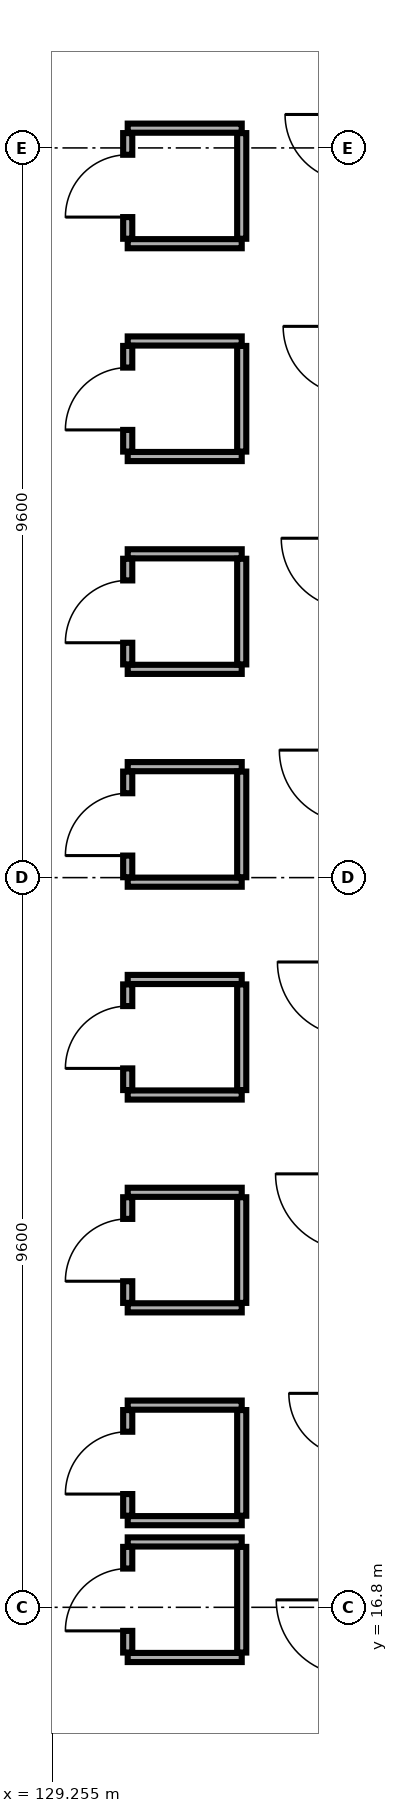
"""IFC4 building model, lengths in metres.
Left out: names, types, materials, properties, quantities, classifications, styles, units other than length and angle.
Written with IfcOpenShell. Run it as: python <this file> out.ifc"""

import sys

from ifc_helpers import new_model, si_unit, direction, frame, frame_2d, origin, place, context, subcontext, project, spatial, rectangle, extrude, element, fill, save


model = new_model("IFC4")
c1 = context("Model", 3, precision=1e-05, world=origin(), true_north=direction((0.0, 1.0)))
c2 = subcontext(c1, "Body", "Model", "MODEL_VIEW")
j1 = project(units=[si_unit("LENGTHUNIT", "METRE"), si_unit("PLANEANGLEUNIT", "RADIAN")], contexts=[c1])
p1 = place(None, origin())
s1 = spatial("IfcSite", under=j1, at=p1, CompositionType="ELEMENT")
p2 = place(p1, origin())
s2 = spatial("IfcBuilding", under=s1, at=p2, CompositionType="ELEMENT")
p3 = place(p2, frame((0.0, 0.0, 24.9)))
s3 = spatial("IfcBuildingStorey", under=s2, at=p3, CompositionType="ELEMENT", Elevation=24.9)
for number, where, z_axis, x_axis in (
    (1, (130.25, 34.74, 0.0), (0.0, 0.0, 1.0), (1.0, 0.0, 0.0)),
    (2, (130.25, 36.26, 0.0), (0.0, 0.0, 1.0), (1.0, 0.0, 0.0)),
):
    element("IfcWall", number, at=place(p3, frame(where, z_axis=z_axis, x_axis=x_axis)), inside=s3, PredefinedType="PARTITIONING", context=c2, shape_type="SweptSolid", body=[
        extrude(rectangle(XDim=1.5, YDim=0.12, at=frame_2d((0.75, 0.0))), origin(), (0.0, 0.0, 1.0), 3.19),
    ])
p4 = place(p3, frame((130.25, 34.805, 0.0), z_axis=(0.0, 0.0, 1.0), x_axis=(0.0, 1.0, 0.0)))
e3 = element("IfcWall", 3, at=p4, inside=s3, PredefinedType="PARTITIONING", context=c2, shape_type="SweptSolid", body=[
    extrude(rectangle(XDim=1.39, YDim=0.12, at=frame_2d((0.695, 0.0))), origin(), (0.0, 0.0, 1.0), 3.19),
])
p5 = place(p4, frame((0.285, 0.0, 0.0)))
e4 = element("IfcOpeningElement", 4, at=p5, cuts=e3, PredefinedType="OPENING", context=c2, shape_type="SweptSolid", body=[
    extrude(rectangle(XDim=0.82, YDim=2.08, at=frame_2d((0.41, 1.04))), frame((0.0, 0.07, 0.0), z_axis=(0.0, -1.0, 0.0), x_axis=(1.0, 0.0, 0.0)), (0.0, 0.0, 1.0), 0.14),
])
p6 = place(p3, frame((131.75, 34.805, 0.0), z_axis=(0.0, 0.0, 1.0), x_axis=(0.0, 1.0, 0.0)))
e5 = element("IfcWall", 5, at=p6, inside=s3, PredefinedType="PARTITIONING", context=c2, shape_type="SweptSolid", body=[
    extrude(rectangle(XDim=1.39, YDim=0.12, at=frame_2d((0.695, 0.0))), origin(), (0.0, 0.0, 1.0), 3.19),
])
for number, where, z_axis, x_axis in (
    (6, (130.25, 31.94, 0.0), (0.0, 0.0, 1.0), (1.0, 0.0, 0.0)),
    (7, (130.25, 33.46, 0.0), (0.0, 0.0, 1.0), (1.0, 0.0, 0.0)),
):
    element("IfcWall", number, at=place(p3, frame(where, z_axis=z_axis, x_axis=x_axis)), inside=s3, PredefinedType="PARTITIONING", context=c2, shape_type="SweptSolid", body=[
        extrude(rectangle(XDim=1.5, YDim=0.12, at=frame_2d((0.75, 0.0))), origin(), (0.0, 0.0, 1.0), 3.19),
    ])
p7 = place(p3, frame((130.25, 32.005, 0.0), z_axis=(0.0, 0.0, 1.0), x_axis=(0.0, 1.0, 0.0)))
e8 = element("IfcWall", 8, at=p7, inside=s3, PredefinedType="PARTITIONING", context=c2, shape_type="SweptSolid", body=[
    extrude(rectangle(XDim=1.39, YDim=0.12, at=frame_2d((0.695, 0.0))), origin(), (0.0, 0.0, 1.0), 3.19),
])
p8 = place(p7, frame((0.285, 0.0, 0.0)))
e9 = element("IfcOpeningElement", 9, at=p8, cuts=e8, PredefinedType="OPENING", context=c2, shape_type="SweptSolid", body=[
    extrude(rectangle(XDim=0.82, YDim=2.08, at=frame_2d((0.41, 1.04))), frame((0.0, 0.07, 0.0), z_axis=(0.0, -1.0, 0.0), x_axis=(1.0, 0.0, 0.0)), (0.0, 0.0, 1.0), 0.14),
])
p9 = place(p3, frame((131.75, 32.005, 0.0), z_axis=(0.0, 0.0, 1.0), x_axis=(0.0, 1.0, 0.0)))
e10 = element("IfcWall", 10, at=p9, inside=s3, PredefinedType="PARTITIONING", context=c2, shape_type="SweptSolid", body=[
    extrude(rectangle(XDim=1.39, YDim=0.12, at=frame_2d((0.695, 0.0))), origin(), (0.0, 0.0, 1.0), 3.19),
])
for number, where, z_axis, x_axis in (
    (11, (130.25, 29.14, 0.0), (0.0, 0.0, 1.0), (1.0, 0.0, 0.0)),
    (12, (130.25, 30.66, 0.0), (0.0, 0.0, 1.0), (1.0, 0.0, 0.0)),
):
    element("IfcWall", number, at=place(p3, frame(where, z_axis=z_axis, x_axis=x_axis)), inside=s3, PredefinedType="PARTITIONING", context=c2, shape_type="SweptSolid", body=[
        extrude(rectangle(XDim=1.5, YDim=0.12, at=frame_2d((0.75, 0.0))), origin(), (0.0, 0.0, 1.0), 3.19),
    ])
p10 = place(p3, frame((130.25, 29.205, 0.0), z_axis=(0.0, 0.0, 1.0), x_axis=(0.0, 1.0, 0.0)))
e13 = element("IfcWall", 13, at=p10, inside=s3, PredefinedType="PARTITIONING", context=c2, shape_type="SweptSolid", body=[
    extrude(rectangle(XDim=1.39, YDim=0.12, at=frame_2d((0.695, 0.0))), origin(), (0.0, 0.0, 1.0), 3.19),
])
p11 = place(p10, frame((0.285, 0.0, 0.0)))
e14 = element("IfcOpeningElement", 14, at=p11, cuts=e13, PredefinedType="OPENING", context=c2, shape_type="SweptSolid", body=[
    extrude(rectangle(XDim=0.82, YDim=2.08, at=frame_2d((0.41, 1.04))), frame((0.0, 0.07, 0.0), z_axis=(0.0, -1.0, 0.0), x_axis=(1.0, 0.0, 0.0)), (0.0, 0.0, 1.0), 0.14),
])
p12 = place(p3, frame((131.75, 29.205, 0.0), z_axis=(0.0, 0.0, 1.0), x_axis=(0.0, 1.0, 0.0)))
e15 = element("IfcWall", 15, at=p12, inside=s3, PredefinedType="PARTITIONING", context=c2, shape_type="SweptSolid", body=[
    extrude(rectangle(XDim=1.39, YDim=0.12, at=frame_2d((0.695, 0.0))), origin(), (0.0, 0.0, 1.0), 3.19),
])
for number, where, z_axis, x_axis in (
    (16, (130.25, 26.34, 0.0), (0.0, 0.0, 1.0), (1.0, 0.0, 0.0)),
    (17, (130.25, 27.86, 0.0), (0.0, 0.0, 1.0), (1.0, 0.0, 0.0)),
):
    element("IfcWall", number, at=place(p3, frame(where, z_axis=z_axis, x_axis=x_axis)), inside=s3, PredefinedType="PARTITIONING", context=c2, shape_type="SweptSolid", body=[
        extrude(rectangle(XDim=1.5, YDim=0.12, at=frame_2d((0.75, 0.0))), origin(), (0.0, 0.0, 1.0), 3.19),
    ])
p13 = place(p3, frame((130.25, 26.405, 0.0), z_axis=(0.0, 0.0, 1.0), x_axis=(0.0, 1.0, 0.0)))
e18 = element("IfcWall", 18, at=p13, inside=s3, PredefinedType="PARTITIONING", context=c2, shape_type="SweptSolid", body=[
    extrude(rectangle(XDim=1.39, YDim=0.12, at=frame_2d((0.695, 0.0))), origin(), (0.0, 0.0, 1.0), 3.19),
])
p14 = place(p13, frame((0.285, 0.0, 0.0)))
e19 = element("IfcOpeningElement", 19, at=p14, cuts=e18, PredefinedType="OPENING", context=c2, shape_type="SweptSolid", body=[
    extrude(rectangle(XDim=0.82, YDim=2.08, at=frame_2d((0.41, 1.04))), frame((0.0, 0.07, 0.0), z_axis=(0.0, -1.0, 0.0), x_axis=(1.0, 0.0, 0.0)), (0.0, 0.0, 1.0), 0.14),
])
p15 = place(p3, frame((131.75, 26.405, 0.0), z_axis=(0.0, 0.0, 1.0), x_axis=(0.0, 1.0, 0.0)))
e20 = element("IfcWall", 20, at=p15, inside=s3, PredefinedType="PARTITIONING", context=c2, shape_type="SweptSolid", body=[
    extrude(rectangle(XDim=1.39, YDim=0.12, at=frame_2d((0.695, 0.0))), origin(), (0.0, 0.0, 1.0), 3.19),
])
for number, where, z_axis, x_axis in (
    (21, (130.25, 23.54, 0.0), (0.0, 0.0, 1.0), (1.0, 0.0, 0.0)),
    (22, (130.25, 25.06, 0.0), (0.0, 0.0, 1.0), (1.0, 0.0, 0.0)),
):
    element("IfcWall", number, at=place(p3, frame(where, z_axis=z_axis, x_axis=x_axis)), inside=s3, PredefinedType="PARTITIONING", context=c2, shape_type="SweptSolid", body=[
        extrude(rectangle(XDim=1.5, YDim=0.12, at=frame_2d((0.75, 0.0))), origin(), (0.0, 0.0, 1.0), 3.19),
    ])
p16 = place(p3, frame((130.25, 23.605, 0.0), z_axis=(0.0, 0.0, 1.0), x_axis=(0.0, 1.0, 0.0)))
e23 = element("IfcWall", 23, at=p16, inside=s3, PredefinedType="PARTITIONING", context=c2, shape_type="SweptSolid", body=[
    extrude(rectangle(XDim=1.39, YDim=0.12, at=frame_2d((0.695, 0.0))), origin(), (0.0, 0.0, 1.0), 2.725),
])
p17 = place(p16, frame((0.285, 0.0, 0.0)))
e24 = element("IfcOpeningElement", 24, at=p17, cuts=e23, PredefinedType="OPENING", context=c2, shape_type="SweptSolid", body=[
    extrude(rectangle(XDim=0.82, YDim=2.08, at=frame_2d((0.41, 1.04))), frame((0.0, 0.07, 0.0), z_axis=(0.0, -1.0, 0.0), x_axis=(1.0, 0.0, 0.0)), (0.0, 0.0, 1.0), 0.14),
])
p18 = place(p3, frame((131.75, 23.605, 0.0), z_axis=(0.0, 0.0, 1.0), x_axis=(0.0, 1.0, 0.0)))
e25 = element("IfcWall", 25, at=p18, inside=s3, PredefinedType="PARTITIONING", context=c2, shape_type="SweptSolid", body=[
    extrude(rectangle(XDim=1.39, YDim=0.12, at=frame_2d((0.695, 0.0))), origin(), (0.0, 0.0, 1.0), 2.725),
])
for number, where, z_axis, x_axis in (
    (26, (130.25, 20.74, 0.0), (0.0, 0.0, 1.0), (1.0, 0.0, 0.0)),
    (27, (130.25, 22.26, 0.0), (0.0, 0.0, 1.0), (1.0, 0.0, 0.0)),
):
    element("IfcWall", number, at=place(p3, frame(where, z_axis=z_axis, x_axis=x_axis)), inside=s3, PredefinedType="PARTITIONING", context=c2, shape_type="SweptSolid", body=[
        extrude(rectangle(XDim=1.5, YDim=0.12, at=frame_2d((0.75, 0.0))), origin(), (0.0, 0.0, 1.0), 3.19),
    ])
p19 = place(p3, frame((130.25, 20.805, 0.0), z_axis=(0.0, 0.0, 1.0), x_axis=(0.0, 1.0, 0.0)))
e28 = element("IfcWall", 28, at=p19, inside=s3, PredefinedType="PARTITIONING", context=c2, shape_type="SweptSolid", body=[
    extrude(rectangle(XDim=1.39, YDim=0.12, at=frame_2d((0.695, 0.0))), origin(), (0.0, 0.0, 1.0), 3.19),
])
p20 = place(p19, frame((0.285, 0.0, 0.0)))
e29 = element("IfcOpeningElement", 29, at=p20, cuts=e28, PredefinedType="OPENING", context=c2, shape_type="SweptSolid", body=[
    extrude(rectangle(XDim=0.82, YDim=2.08, at=frame_2d((0.41, 1.04))), frame((0.0, 0.07, 0.0), z_axis=(0.0, -1.0, 0.0), x_axis=(1.0, 0.0, 0.0)), (0.0, 0.0, 1.0), 0.14),
])
p21 = place(p3, frame((131.75, 20.805, 0.0), z_axis=(0.0, 0.0, 1.0), x_axis=(0.0, 1.0, 0.0)))
e30 = element("IfcWall", 30, at=p21, inside=s3, PredefinedType="PARTITIONING", context=c2, shape_type="SweptSolid", body=[
    extrude(rectangle(XDim=1.39, YDim=0.12, at=frame_2d((0.695, 0.0))), origin(), (0.0, 0.0, 1.0), 3.19),
])
for number, where, z_axis, x_axis in (
    (31, (130.25, 17.94, 0.0), (0.0, 0.0, 1.0), (1.0, 0.0, 0.0)),
    (32, (130.25, 19.46, 0.0), (0.0, 0.0, 1.0), (1.0, 0.0, 0.0)),
):
    element("IfcWall", number, at=place(p3, frame(where, z_axis=z_axis, x_axis=x_axis)), inside=s3, PredefinedType="PARTITIONING", context=c2, shape_type="SweptSolid", body=[
        extrude(rectangle(XDim=1.5, YDim=0.12, at=frame_2d((0.75, 0.0))), origin(), (0.0, 0.0, 1.0), 3.19),
    ])
p22 = place(p3, frame((130.25, 18.005, 0.0), z_axis=(0.0, 0.0, 1.0), x_axis=(0.0, 1.0, 0.0)))
e33 = element("IfcWall", 33, at=p22, inside=s3, PredefinedType="PARTITIONING", context=c2, shape_type="SweptSolid", body=[
    extrude(rectangle(XDim=1.39, YDim=0.12, at=frame_2d((0.695, 0.0))), origin(), (0.0, 0.0, 1.0), 3.19),
])
p23 = place(p22, frame((0.285, 0.0, 0.0)))
e34 = element("IfcOpeningElement", 34, at=p23, cuts=e33, PredefinedType="OPENING", context=c2, shape_type="SweptSolid", body=[
    extrude(rectangle(XDim=0.82, YDim=2.08, at=frame_2d((0.41, 1.04))), frame((0.0, 0.07, 0.0), z_axis=(0.0, -1.0, 0.0), x_axis=(1.0, 0.0, 0.0)), (0.0, 0.0, 1.0), 0.14),
])
p24 = place(p3, frame((131.75, 18.005, 0.0), z_axis=(0.0, 0.0, 1.0), x_axis=(0.0, 1.0, 0.0)))
e35 = element("IfcWall", 35, at=p24, inside=s3, PredefinedType="PARTITIONING", context=c2, shape_type="SweptSolid", body=[
    extrude(rectangle(XDim=1.39, YDim=0.12, at=frame_2d((0.695, 0.0))), origin(), (0.0, 0.0, 1.0), 3.19),
])
for number, where, z_axis, x_axis in (
    (36, (130.25, 16.14, 0.0), (0.0, 0.0, 1.0), (1.0, 0.0, 0.0)),
    (37, (130.25, 17.66, 0.0), (0.0, 0.0, 1.0), (1.0, 0.0, 0.0)),
):
    element("IfcWall", number, at=place(p3, frame(where, z_axis=z_axis, x_axis=x_axis)), inside=s3, PredefinedType="PARTITIONING", context=c2, shape_type="SweptSolid", body=[
        extrude(rectangle(XDim=1.5, YDim=0.12, at=frame_2d((0.75, 0.0))), origin(), (0.0, 0.0, 1.0), 3.19),
    ])
p25 = place(p3, frame((130.25, 16.205, 0.0), z_axis=(0.0, 0.0, 1.0), x_axis=(0.0, 1.0, 0.0)))
e38 = element("IfcWall", 38, at=p25, inside=s3, PredefinedType="PARTITIONING", context=c2, shape_type="SweptSolid", body=[
    extrude(rectangle(XDim=1.39, YDim=0.12, at=frame_2d((0.695, 0.0))), origin(), (0.0, 0.0, 1.0), 2.725),
])
p26 = place(p25, frame((0.285, 0.0, 0.0)))
e39 = element("IfcOpeningElement", 39, at=p26, cuts=e38, PredefinedType="OPENING", context=c2, shape_type="SweptSolid", body=[
    extrude(rectangle(XDim=0.82, YDim=2.08, at=frame_2d((0.41, 1.04))), frame((0.0, 0.07, 0.0), z_axis=(0.0, -1.0, 0.0), x_axis=(1.0, 0.0, 0.0)), (0.0, 0.0, 1.0), 0.14),
])
p27 = place(p3, frame((131.75, 16.205, 0.0), z_axis=(0.0, 0.0, 1.0), x_axis=(0.0, 1.0, 0.0)))
e40 = element("IfcWall", 40, at=p27, inside=s3, PredefinedType="PARTITIONING", context=c2, shape_type="SweptSolid", body=[
    extrude(rectangle(XDim=1.39, YDim=0.12, at=frame_2d((0.695, 0.0))), origin(), (0.0, 0.0, 1.0), 2.725),
])
p28 = place(p5, origin())
e41 = element("IfcDoor", 41, at=p28, inside=s3, OperationType="SINGLE_SWING_LEFT", PredefinedType="DOOR", context=c2, shape_type="SweptSolid", body=[
    extrude(rectangle(XDim=0.82, YDim=2.08, at=frame_2d((0.41, 1.04))), frame((0.0, 0.025, 0.0), z_axis=(0.0, -1.0, 0.0), x_axis=(1.0, 0.0, 0.0)), (0.0, 0.0, 1.0), 0.05),
])
fill(e4, e41)
p29 = place(p8, origin())
e42 = element("IfcDoor", 42, at=p29, inside=s3, OperationType="SINGLE_SWING_LEFT", PredefinedType="DOOR", context=c2, shape_type="SweptSolid", body=[
    extrude(rectangle(XDim=0.82, YDim=2.08, at=frame_2d((0.41, 1.04))), frame((0.0, 0.025, 0.0), z_axis=(0.0, -1.0, 0.0), x_axis=(1.0, 0.0, 0.0)), (0.0, 0.0, 1.0), 0.05),
])
fill(e9, e42)
p30 = place(p11, origin())
e43 = element("IfcDoor", 43, at=p30, inside=s3, OperationType="SINGLE_SWING_LEFT", PredefinedType="DOOR", context=c2, shape_type="SweptSolid", body=[
    extrude(rectangle(XDim=0.82, YDim=2.08, at=frame_2d((0.41, 1.04))), frame((0.0, 0.025, 0.0), z_axis=(0.0, -1.0, 0.0), x_axis=(1.0, 0.0, 0.0)), (0.0, 0.0, 1.0), 0.05),
])
fill(e14, e43)
p31 = place(p14, origin())
e44 = element("IfcDoor", 44, at=p31, inside=s3, OperationType="SINGLE_SWING_LEFT", PredefinedType="DOOR", context=c2, shape_type="SweptSolid", body=[
    extrude(rectangle(XDim=0.82, YDim=2.08, at=frame_2d((0.41, 1.04))), frame((0.0, 0.025, 0.0), z_axis=(0.0, -1.0, 0.0), x_axis=(1.0, 0.0, 0.0)), (0.0, 0.0, 1.0), 0.05),
])
fill(e19, e44)
p32 = place(p17, origin())
e45 = element("IfcDoor", 45, at=p32, inside=s3, OperationType="SINGLE_SWING_LEFT", PredefinedType="DOOR", context=c2, shape_type="SweptSolid", body=[
    extrude(rectangle(XDim=0.82, YDim=2.08, at=frame_2d((0.41, 1.04))), frame((0.0, 0.025, 0.0), z_axis=(0.0, -1.0, 0.0), x_axis=(1.0, 0.0, 0.0)), (0.0, 0.0, 1.0), 0.05),
])
fill(e24, e45)
p33 = place(p20, origin())
e46 = element("IfcDoor", 46, at=p33, inside=s3, OperationType="SINGLE_SWING_LEFT", PredefinedType="DOOR", context=c2, shape_type="SweptSolid", body=[
    extrude(rectangle(XDim=0.82, YDim=2.08, at=frame_2d((0.41, 1.04))), frame((0.0, 0.025, 0.0), z_axis=(0.0, -1.0, 0.0), x_axis=(1.0, 0.0, 0.0)), (0.0, 0.0, 1.0), 0.05),
])
fill(e29, e46)
p34 = place(p23, origin())
e47 = element("IfcDoor", 47, at=p34, inside=s3, OperationType="SINGLE_SWING_LEFT", PredefinedType="DOOR", context=c2, shape_type="SweptSolid", body=[
    extrude(rectangle(XDim=0.82, YDim=2.08, at=frame_2d((0.41, 1.04))), frame((0.0, 0.025, 0.0), z_axis=(0.0, -1.0, 0.0), x_axis=(1.0, 0.0, 0.0)), (0.0, 0.0, 1.0), 0.05),
])
fill(e34, e47)
p35 = place(p26, origin())
e48 = element("IfcDoor", 48, at=p35, inside=s3, OperationType="SINGLE_SWING_LEFT", PredefinedType="DOOR", context=c2, shape_type="SweptSolid", body=[
    extrude(rectangle(XDim=0.82, YDim=2.08, at=frame_2d((0.41, 1.04))), frame((0.0, 0.025, 0.0), z_axis=(0.0, -1.0, 0.0), x_axis=(1.0, 0.0, 0.0)), (0.0, 0.0, 1.0), 0.05),
])
fill(e39, e48)
save(model, sys.argv[1])
